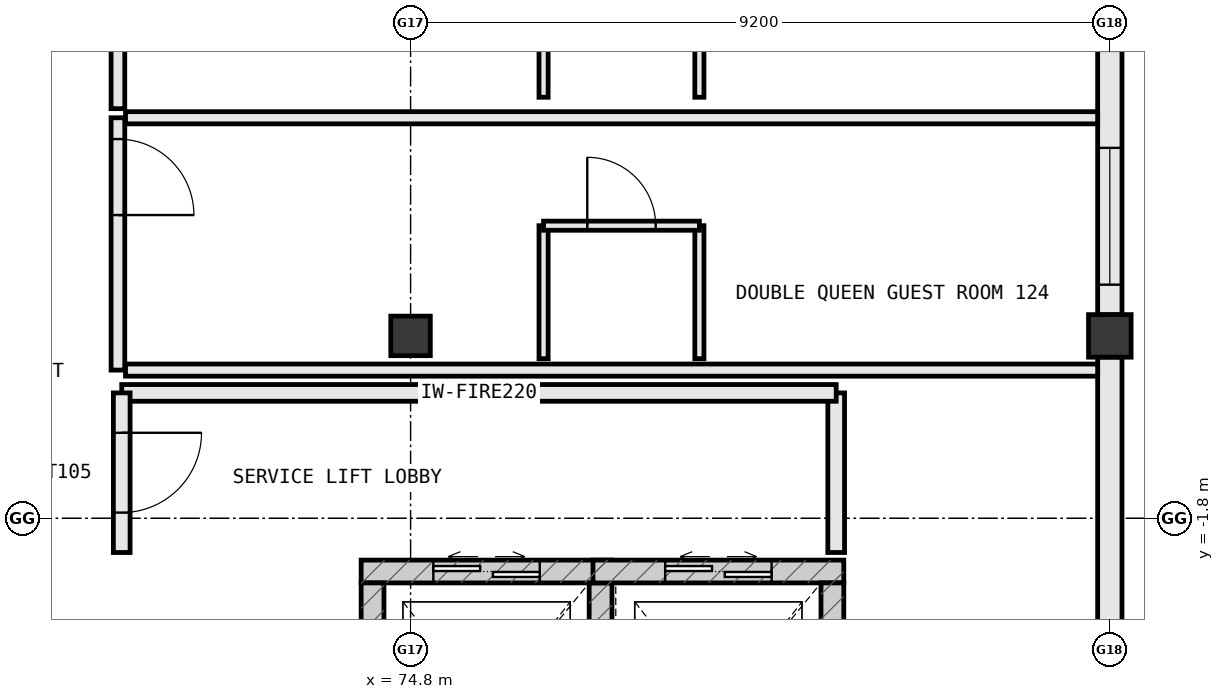
"""IFC4 building model, lengths in metres.
Left out: names, types, materials, properties, quantities, classifications, styles, units other than length and angle.
Written with IfcOpenShell. Run it as: python <this file> out.ifc"""

import sys

from ifc_helpers import new_model, si_unit, direction, frame, frame_2d, origin, origin_2d, place, context, subcontext, project, spatial, rectangle, extrude, element, fill, save


model = new_model("IFC4")
c1 = context("Model", 3, precision=1e-05, world=origin(), true_north=direction((0.0, 1.0)))
c2 = subcontext(c1, "Body", "Model", "MODEL_VIEW")
j1 = project(units=[si_unit("LENGTHUNIT", "METRE"), si_unit("PLANEANGLEUNIT", "RADIAN")], contexts=[c1])
p1 = place(None, origin())
s1 = spatial("IfcSite", under=j1, at=p1, CompositionType="ELEMENT")
p2 = place(p1, origin())
s2 = spatial("IfcBuilding", under=s1, at=p2, CompositionType="ELEMENT")
p3 = place(p2, frame((0.0, 0.0, 20.0)))
s3 = spatial("IfcBuildingStorey", under=s2, at=p3, CompositionType="ELEMENT", Elevation=20.0)
p4 = place(p3, frame((74.8, 0.6, 0.0), z_axis=(0.0, 0.0, 1.0), x_axis=(1.0, 0.0, 0.0)))
e1 = element("IfcColumn", 1, at=p4, inside=s3, PredefinedType="COLUMN", context=c2, shape_type="SweptSolid", body=[
    extrude(rectangle(XDim=0.52, YDim=0.52, at=origin_2d()), origin(), (0.0, 0.0, 1.0), 3.8),
])
p5 = place(p3, frame((84.0, 0.6, 0.0), z_axis=(0.0, 0.0, 1.0), x_axis=(1.0, 0.0, 0.0)))
e2 = element("IfcColumn", 2, at=p5, inside=s3, PredefinedType="COLUMN", context=c2, shape_type="SweptSolid", body=[
    extrude(rectangle(XDim=0.56, YDim=0.56, at=origin_2d()), origin(), (0.0, 0.0, 1.0), 3.8),
])
p6 = place(p3, frame((84.0, -8.722, 0.0), z_axis=(0.0, 0.0, 1.0), x_axis=(0.0, 1.0, 0.0)))
e3 = element("IfcWall", 3, at=p6, inside=s3, PredefinedType="STANDARD", context=c2, shape_type="SweptSolid", body=[
    extrude(rectangle(XDim=9.044, YDim=0.32, at=frame_2d((4.522, 0.0))), origin(), (0.0, 0.0, 1.0), 2.965),
])
p7 = place(p6, frame((1.361, 0.0, 0.85)))
e4 = element("IfcOpeningElement", 4, at=p7, cuts=e3, PredefinedType="OPENING", context=c2, shape_type="SweptSolid", body=[
    extrude(rectangle(XDim=1.8, YDim=1.85, at=frame_2d((0.9, 0.925))), frame((0.0, 0.172, 0.0), z_axis=(0.0, -1.0, 0.0), x_axis=(1.0, 0.0, 0.0)), (0.0, 0.0, 1.0), 0.344),
])
p8 = place(p3, frame((84.0, 0.878, 0.0), z_axis=(0.0, 0.0, 1.0), x_axis=(0.0, 1.0, 0.0)))
e5 = element("IfcWall", 5, at=p8, inside=s3, PredefinedType="STANDARD", context=c2, shape_type="SweptSolid", body=[
    extrude(rectangle(XDim=9.044, YDim=0.32, at=frame_2d((4.522, 0.0))), origin(), (0.0, 0.0, 1.0), 2.965),
])
p9 = place(p8, frame((0.396, 0.0, 0.85)))
e6 = element("IfcOpeningElement", 6, at=p9, cuts=e5, PredefinedType="OPENING", context=c2, shape_type="SweptSolid", body=[
    extrude(rectangle(XDim=1.8, YDim=1.85, at=frame_2d((0.9, 0.925))), frame((0.0, 0.172, 0.0), z_axis=(0.0, -1.0, 0.0), x_axis=(1.0, 0.0, 0.0)), (0.0, 0.0, 1.0), 0.344),
])
p10 = place(p8, frame((3.472, 0.0, 0.85)))
e7 = element("IfcOpeningElement", 7, at=p10, cuts=e5, PredefinedType="OPENING", context=c2, shape_type="SweptSolid", body=[
    extrude(rectangle(XDim=1.8, YDim=1.85, at=frame_2d((0.9, 0.925))), frame((0.0, 0.172, 0.0), z_axis=(0.0, -1.0, 0.0), x_axis=(1.0, 0.0, 0.0)), (0.0, 0.0, 1.0), 0.344),
])
p11 = place(p8, frame((6.698, 0.0, 0.85)))
e8 = element("IfcOpeningElement", 8, at=p11, cuts=e5, PredefinedType="OPENING", context=c2, shape_type="SweptSolid", body=[
    extrude(rectangle(XDim=1.8, YDim=1.85, at=frame_2d((0.9, 0.925))), frame((0.0, 0.172, 0.0), z_axis=(0.0, -1.0, 0.0), x_axis=(1.0, 0.0, 0.0)), (0.0, 0.0, 1.0), 0.344),
])
p12 = place(p3, frame((77.45, -2.5, 0.0), z_axis=(0.0, 0.0, 1.0), x_axis=(-1.0, 0.0, 0.0)))
e9 = element("IfcWall", 9, at=p12, inside=s3, PredefinedType="SHEAR", context=c2, shape_type="SweptSolid", body=[
    extrude(rectangle(XDim=3.3, YDim=0.3, at=frame_2d((1.65, 0.0))), origin(), (0.0, 0.0, 1.0), 3.8),
])
p13 = place(p12, frame((0.95, 0.0, 0.0)))
e10 = element("IfcOpeningElement", 10, at=p13, cuts=e9, PredefinedType="OPENING", context=c2, shape_type="SweptSolid", body=[
    extrude(rectangle(XDim=1.4, YDim=2.2, at=frame_2d((0.7, 1.1))), frame((0.0, 0.162, 0.0), z_axis=(0.0, -1.0, 0.0), x_axis=(1.0, 0.0, 0.0)), (0.0, 0.0, 1.0), 0.324),
])
for number, where, z_axis, x_axis in (
    (11, (77.3, -5.95, 0.0), (0.0, 0.0, 1.0), (0.0, 1.0, 0.0)),
    (12, (74.3, -2.65, 0.0), (0.0, 0.0, 1.0), (0.0, -1.0, 0.0)),
):
    element("IfcWall", number, at=place(p3, frame(where, z_axis=z_axis, x_axis=x_axis)), inside=s3, PredefinedType="SHEAR", context=c2, shape_type="SweptSolid", body=[
        extrude(rectangle(XDim=3.3, YDim=0.3, at=frame_2d((1.65, 0.0))), origin(), (0.0, 0.0, 1.0), 3.8),
    ])
p14 = place(p3, frame((80.5, -2.5, 0.0), z_axis=(0.0, 0.0, 1.0), x_axis=(-1.0, 0.0, 0.0)))
e13 = element("IfcWall", 13, at=p14, inside=s3, PredefinedType="SHEAR", context=c2, shape_type="SweptSolid", body=[
    extrude(rectangle(XDim=3.3, YDim=0.3, at=frame_2d((1.65, 0.0))), origin(), (0.0, 0.0, 1.0), 3.8),
])
p15 = place(p14, frame((0.95, 0.0, 0.0)))
e14 = element("IfcOpeningElement", 14, at=p15, cuts=e13, PredefinedType="OPENING", context=c2, shape_type="SweptSolid", body=[
    extrude(rectangle(XDim=1.4, YDim=2.2, at=frame_2d((0.7, 1.1))), frame((0.0, 0.162, 0.0), z_axis=(0.0, -1.0, 0.0), x_axis=(1.0, 0.0, 0.0)), (0.0, 0.0, 1.0), 0.324),
])
p16 = place(p3, frame((80.35, -5.95, 0.0), z_axis=(0.0, 0.0, 1.0), x_axis=(0.0, 1.0, 0.0)))
e15 = element("IfcWall", 15, at=p16, inside=s3, PredefinedType="SHEAR", context=c2, shape_type="SweptSolid", body=[
    extrude(rectangle(XDim=3.3, YDim=0.3, at=frame_2d((1.65, 0.0))), origin(), (0.0, 0.0, 1.0), 3.8),
])
p17 = place(p3, frame((80.4, -2.25, 0.0), z_axis=(0.0, 0.0, 1.0), x_axis=(0.0, 1.0, 0.0)))
e16 = element("IfcWall", 16, at=p17, inside=s3, PredefinedType="STANDARD", context=c2, shape_type="SweptSolid", body=[
    extrude(rectangle(XDim=2.1, YDim=0.22, at=frame_2d((1.05, 0.0))), origin(), (0.0, 0.0, 1.0), 3.55),
])
p18 = place(p3, frame((80.4, -0.15, 0.0), z_axis=(0.0, 0.0, 1.0), x_axis=(-1.0, 0.0, 0.0)))
e17 = element("IfcWall", 17, at=p18, inside=s3, PredefinedType="STANDARD", context=c2, shape_type="SweptSolid", body=[
    extrude(rectangle(XDim=9.4, YDim=0.22, at=frame_2d((4.7, 0.0))), origin(), (0.0, 0.0, 1.0), 3.55),
])
p19 = place(p3, frame((71.0, -0.15, 0.0), z_axis=(0.0, 0.0, 1.0), x_axis=(0.0, -1.0, 0.0)))
e18 = element("IfcWall", 18, at=p19, inside=s3, PredefinedType="STANDARD", context=c2, shape_type="SweptSolid", body=[
    extrude(rectangle(XDim=2.1, YDim=0.22, at=frame_2d((1.05, 0.0))), origin(), (0.0, 0.0, 1.0), 3.55),
])
p20 = place(p19, frame((0.525, 0.0, 0.0)))
e19 = element("IfcOpeningElement", 19, at=p20, cuts=e18, PredefinedType="OPENING", context=c2, shape_type="SweptSolid", body=[
    extrude(rectangle(XDim=1.05, YDim=2.2, at=frame_2d((0.525, 1.1))), frame((0.0, 0.122, 0.0), z_axis=(0.0, -1.0, 0.0), x_axis=(1.0, 0.0, 0.0)), (0.0, 0.0, 1.0), 0.244),
])
p21 = place(p3, frame((70.95, 3.47, 0.0), z_axis=(0.0, 0.0, 1.0), x_axis=(0.0, -1.0, 0.0)))
e20 = element("IfcWall", 20, at=p21, inside=s3, PredefinedType="PARTITIONING", context=c2, shape_type="SweptSolid", body=[
    extrude(rectangle(XDim=3.32, YDim=0.18, at=frame_2d((1.66, 0.0))), origin(), (0.0, 0.0, 1.0), 3.55),
])
p22 = place(p21, frame((0.28, 0.0, 0.0)))
e21 = element("IfcOpeningElement", 21, at=p22, cuts=e20, PredefinedType="OPENING", context=c2, shape_type="SweptSolid", body=[
    extrude(rectangle(XDim=1.0, YDim=2.2, at=frame_2d((0.5, 1.1))), frame((0.0, 0.102, 0.0), z_axis=(0.0, -1.0, 0.0), x_axis=(1.0, 0.0, 0.0)), (0.0, 0.0, 1.0), 0.204),
])
for number, where, z_axis, x_axis in (
    (22, (71.05, 0.15, 0.0), (0.0, 0.0, 1.0), (1.0, 0.0, 0.0)),
    (23, (71.05, 3.47, 0.0), (0.0, 0.0, 1.0), (1.0, 0.0, 0.0)),
):
    element("IfcWall", number, at=place(p3, frame(where, z_axis=z_axis, x_axis=x_axis)), inside=s3, PredefinedType="PARTITIONING", context=c2, shape_type="SweptSolid", body=[
        extrude(rectangle(XDim=12.79, YDim=0.16, at=frame_2d((6.395, 0.0))), origin(), (0.0, 0.0, 1.0), 3.55),
    ])
for number, where, z_axis, x_axis in (
    (24, (76.55, 0.3, 0.0), (0.0, 0.0, 1.0), (0.0, 1.0, 0.0)),
    (25, (78.6, 0.3, 0.0), (0.0, 0.0, 1.0), (0.0, 1.0, 0.0)),
):
    element("IfcWall", number, at=place(p3, frame(where, z_axis=z_axis, x_axis=x_axis)), inside=s3, PredefinedType="PARTITIONING", context=c2, shape_type="SweptSolid", body=[
        extrude(rectangle(XDim=1.75, YDim=0.12, at=frame_2d((0.875, 0.0))), origin(), (0.0, 0.0, 1.0), 3.55),
    ])
p23 = place(p3, frame((76.55, 2.05, 0.0), z_axis=(0.0, 0.0, 1.0), x_axis=(1.0, 0.0, 0.0)))
e26 = element("IfcWall", 26, at=p23, inside=s3, PredefinedType="PARTITIONING", context=c2, shape_type="SweptSolid", body=[
    extrude(rectangle(XDim=2.05, YDim=0.12, at=frame_2d((1.025, 0.0))), origin(), (0.0, 0.0, 1.0), 3.55),
])
p24 = place(p23, frame((0.575, 0.0, 0.0)))
e27 = element("IfcOpeningElement", 27, at=p24, cuts=e26, PredefinedType="OPENING", context=c2, shape_type="SweptSolid", body=[
    extrude(rectangle(XDim=0.9, YDim=2.15, at=frame_2d((0.45, 1.075))), frame((0.0, 0.072, 0.0), z_axis=(0.0, -1.0, 0.0), x_axis=(1.0, 0.0, 0.0)), (0.0, 0.0, 1.0), 0.144),
])
p25 = place(p3, frame((70.95, 6.91, 0.0), z_axis=(0.0, 0.0, 1.0), x_axis=(0.0, -1.0, 0.0)))
e28 = element("IfcWall", 28, at=p25, inside=s3, PredefinedType="PARTITIONING", context=c2, shape_type="SweptSolid", body=[
    extrude(rectangle(XDim=3.32, YDim=0.18, at=frame_2d((1.66, 0.0))), origin(), (0.0, 0.0, 1.0), 3.55),
])
p26 = place(p25, frame((0.28, 0.0, 0.0)))
e29 = element("IfcOpeningElement", 29, at=p26, cuts=e28, PredefinedType="OPENING", context=c2, shape_type="SweptSolid", body=[
    extrude(rectangle(XDim=1.0, YDim=2.2, at=frame_2d((0.5, 1.1))), frame((0.0, 0.102, 0.0), z_axis=(0.0, -1.0, 0.0), x_axis=(1.0, 0.0, 0.0)), (0.0, 0.0, 1.0), 0.204),
])
for number, where, z_axis, x_axis in (
    (30, (76.55, 3.74, 0.0), (0.0, 0.0, 1.0), (0.0, 1.0, 0.0)),
    (31, (78.6, 3.74, 0.0), (0.0, 0.0, 1.0), (0.0, 1.0, 0.0)),
):
    element("IfcWall", number, at=place(p3, frame(where, z_axis=z_axis, x_axis=x_axis)), inside=s3, PredefinedType="PARTITIONING", context=c2, shape_type="SweptSolid", body=[
        extrude(rectangle(XDim=1.75, YDim=0.12, at=frame_2d((0.875, 0.0))), origin(), (0.0, 0.0, 1.0), 3.55),
    ])
p27 = place(p9, origin())
e32 = element("IfcWindow", 32, at=p27, inside=s3, PartitioningType="SINGLE_PANEL", PredefinedType="WINDOW", context=c2, shape_type="SweptSolid", body=[
    extrude(rectangle(XDim=1.8, YDim=1.85, at=frame_2d((0.9, 0.925))), frame((0.0, 0.03, 0.0), z_axis=(0.0, -1.0, 0.0), x_axis=(1.0, 0.0, 0.0)), (0.0, 0.0, 1.0), 0.06),
])
fill(e6, e32)
p28 = place(p13, origin())
e33 = element("IfcDoor", 33, at=p28, inside=s3, OperationType="DOUBLE_DOOR_SLIDING", PredefinedType="DOOR", context=c2, shape_type="SweptSolid", body=[
    extrude(rectangle(XDim=1.4, YDim=2.2, at=frame_2d((0.7, 1.1))), frame((0.0, 0.025, 0.0), z_axis=(0.0, -1.0, 0.0), x_axis=(1.0, 0.0, 0.0)), (0.0, 0.0, 1.0), 0.05),
])
fill(e10, e33)
p29 = place(p15, origin())
e34 = element("IfcDoor", 34, at=p29, inside=s3, OperationType="DOUBLE_DOOR_SLIDING", PredefinedType="DOOR", context=c2, shape_type="SweptSolid", body=[
    extrude(rectangle(XDim=1.4, YDim=2.2, at=frame_2d((0.7, 1.1))), frame((0.0, 0.025, 0.0), z_axis=(0.0, -1.0, 0.0), x_axis=(1.0, 0.0, 0.0)), (0.0, 0.0, 1.0), 0.05),
])
fill(e14, e34)
p30 = place(p20, origin())
e35 = element("IfcDoor", 35, at=p30, inside=s3, OperationType="SINGLE_SWING_LEFT", PredefinedType="DOOR", context=c2, shape_type="SweptSolid", body=[
    extrude(rectangle(XDim=1.05, YDim=2.2, at=frame_2d((0.525, 1.1))), frame((0.0, 0.025, 0.0), z_axis=(0.0, -1.0, 0.0), x_axis=(1.0, 0.0, 0.0)), (0.0, 0.0, 1.0), 0.05),
])
fill(e19, e35)
p31 = place(p22, origin())
e36 = element("IfcDoor", 36, at=p31, inside=s3, OperationType="SINGLE_SWING_RIGHT", PredefinedType="DOOR", context=c2, shape_type="SweptSolid", body=[
    extrude(rectangle(XDim=1.0, YDim=2.2, at=frame_2d((0.5, 1.1))), frame((0.0, 0.025, 0.0), z_axis=(0.0, -1.0, 0.0), x_axis=(1.0, 0.0, 0.0)), (0.0, 0.0, 1.0), 0.05),
])
fill(e21, e36)
p32 = place(p24, origin())
e37 = element("IfcDoor", 37, at=p32, inside=s3, OperationType="SINGLE_SWING_LEFT", PredefinedType="DOOR", context=c2, shape_type="SweptSolid", body=[
    extrude(rectangle(XDim=0.9, YDim=2.15, at=frame_2d((0.45, 1.075))), frame((0.0, 0.025, 0.0), z_axis=(0.0, -1.0, 0.0), x_axis=(1.0, 0.0, 0.0)), (0.0, 0.0, 1.0), 0.05),
])
fill(e27, e37)
save(model, sys.argv[1])
